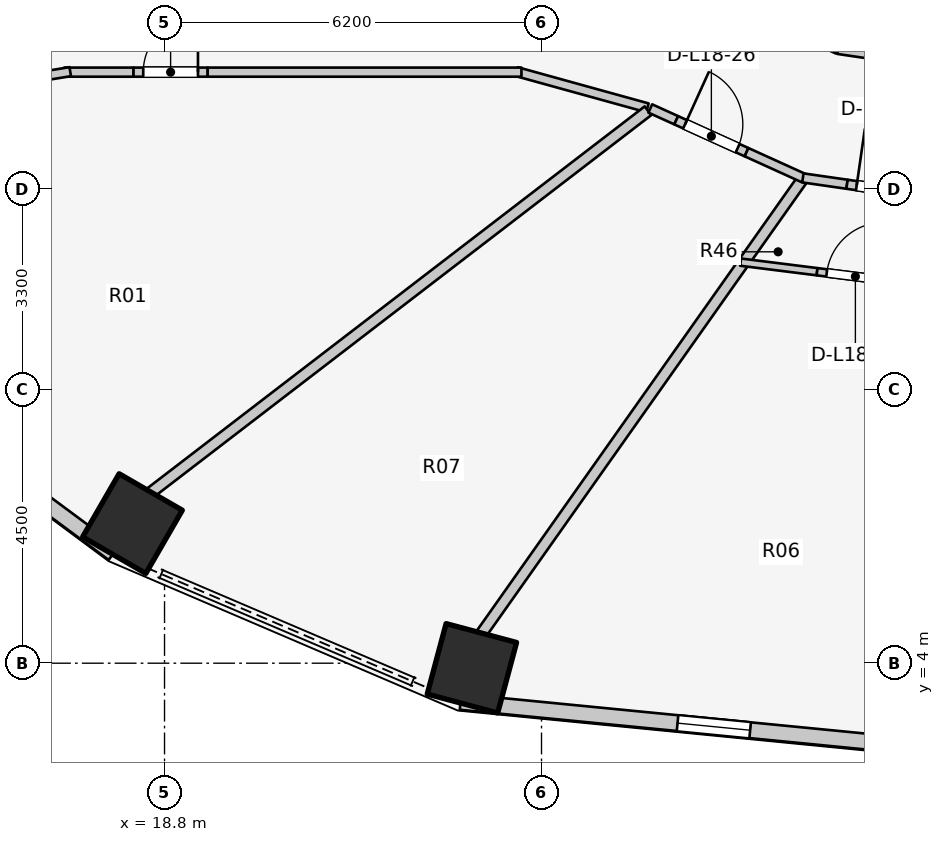
"""IFC4 building model, lengths in metres.
Left out: names, types, materials, properties, quantities, classifications, styles, units other than length and angle.
Written with IfcOpenShell. Run it as: python <this file> out.ifc"""

import sys

from ifc_helpers import new_model, si_unit, direction, frame, frame_2d, origin, origin_2d, place, context, subcontext, project, spatial, rectangle, extrude, element, fill, save


model = new_model("IFC4")
c1 = context("Model", 3, precision=1e-05, world=origin(), true_north=direction((0.0, 1.0)))
c2 = subcontext(c1, "Body", "Model", "MODEL_VIEW")
j1 = project(units=[si_unit("LENGTHUNIT", "METRE"), si_unit("PLANEANGLEUNIT", "RADIAN")], contexts=[c1])
p1 = place(None, origin())
s1 = spatial("IfcSite", under=j1, at=p1, CompositionType="ELEMENT")
p2 = place(p1, origin())
s2 = spatial("IfcBuilding", under=s1, at=p2, CompositionType="ELEMENT")
p3 = place(p2, frame((0.0, 0.0, 61.7)))
s3 = spatial("IfcBuildingStorey", under=s2, at=p3, CompositionType="ELEMENT", Elevation=61.7)
for number, where, z_axis, x_axis in (
    (1, (18.273, 6.296, 0.0), (0.0, 0.0, 1.0), (-0.5, -0.866, 0.0)),
    (2, (23.855, 3.916, 0.0), (0.0, 0.0, 1.0), (-0.259, -0.966, 0.0)),
):
    element("IfcColumn", number, at=place(p3, frame(where, z_axis=z_axis, x_axis=x_axis)), inside=s3, PredefinedType="COLUMN", context=c2, shape_type="SweptSolid", body=[
        extrude(rectangle(XDim=1.2, YDim=1.2, at=origin_2d()), origin(), (0.0, 0.0, 1.0), 3.1),
    ])
p4 = place(p3, frame((13.595, 9.035, 0.0), z_axis=(0.0, 0.0, 1.0), x_axis=(0.803477531792, -0.595335078679, 0.0)))
e3 = element("IfcWall", 3, at=p4, inside=s3, PredefinedType="STANDARD", context=c2, shape_type="SweptSolid", body=[
    extrude(rectangle(XDim=5.43, YDim=0.26, at=frame_2d((2.715, 0.0))), origin(), (0.0, 0.0, 1.0), 1.22),
])
p5 = place(p3, frame((23.668, 3.364, 0.0), z_axis=(0.0, 0.0, 1.0), x_axis=(0.995247718352, -0.097375454379, 0.0)))
e4 = element("IfcWall", 4, at=p5, inside=s3, PredefinedType="STANDARD", context=c2, shape_type="SweptSolid", body=[
    extrude(rectangle(XDim=8.372, YDim=0.26, at=frame_2d((4.186, 0.0))), origin(), (0.0, 0.0, 1.0), 1.22),
])
p6 = place(p5, frame((3.586, 0.0, 0.15)))
e5 = element("IfcOpeningElement", 5, at=p6, cuts=e4, PredefinedType="OPENING", context=c2, shape_type="SweptSolid", body=[
    extrude(rectangle(XDim=1.2, YDim=0.9, at=frame_2d((0.6, 0.45))), frame((0.0, 0.14, 0.0), z_axis=(0.0, -1.0, 0.0), x_axis=(1.0, 0.0, 0.0)), (0.0, 0.0, 1.0), 0.28),
])
p7 = place(p3, frame((27.89, 15.015, 0.0), z_axis=(0.0, 0.0, 1.0), x_axis=(0.906943449489, -0.421252393975, 0.0)))
e6 = element("IfcWall", 6, at=p7, inside=s3, PredefinedType="PARTITIONING", context=c2, shape_type="SweptSolid", body=[
    extrude(rectangle(XDim=2.186, YDim=0.15, at=frame_2d((1.093, 0.0))), origin(), (0.0, 0.0, 1.0), 1.22),
])
p8 = place(p3, frame((29.873, 14.094, 0.0), z_axis=(0.0, 0.0, 1.0), x_axis=(0.989268584896, -0.146108408166, 0.0)))
e7 = element("IfcWall", 7, at=p8, inside=s3, PredefinedType="PARTITIONING", context=c2, shape_type="SweptSolid", body=[
    extrude(rectangle(XDim=2.151, YDim=0.15, at=frame_2d((1.075, 0.0))), origin(), (0.0, 0.0, 1.0), 1.22),
])
p9 = place(p3, frame((26.742, 13.133, 0.0), z_axis=(0.0, 0.0, 1.0), x_axis=(-0.963833843713, 0.266503886865, 0.0)))
e8 = element("IfcWall", 8, at=p9, inside=s3, PredefinedType="PARTITIONING", context=c2, shape_type="SweptSolid", body=[
    extrude(rectangle(XDim=2.232, YDim=0.15, at=frame_2d((1.116, 0.0))), origin(), (0.0, 0.0, 1.0), 1.22),
])
p10 = place(p3, frame((17.15, 13.72, 0.0), z_axis=(0.0, 0.0, 1.0), x_axis=(1.0, 0.0, 0.0)))
e9 = element("IfcWall", 9, at=p10, inside=s3, PredefinedType="PARTITIONING", context=c2, shape_type="SweptSolid", body=[
    extrude(rectangle(XDim=1.14, YDim=0.15, at=frame_2d((0.57, 0.0))), origin(), (0.0, 0.0, 1.0), 2.575),
])
p11 = place(p3, frame((18.29, 13.72, 0.0), z_axis=(0.0, 0.0, 1.0), x_axis=(1.0, 0.0, 0.0)))
e10 = element("IfcWall", 10, at=p11, inside=s3, PredefinedType="PARTITIONING", context=c2, shape_type="SweptSolid", body=[
    extrude(rectangle(XDim=1.22, YDim=0.15, at=frame_2d((0.61, 0.0))), origin(), (0.0, 0.0, 1.0), 2.575),
])
p12 = place(p11, frame((0.16, 0.0, 0.0)))
e11 = element("IfcOpeningElement", 11, at=p12, cuts=e10, PredefinedType="OPENING", context=c2, shape_type="SweptSolid", body=[
    extrude(rectangle(XDim=0.9, YDim=2.1, at=frame_2d((0.45, 1.05))), frame((0.0, 0.085, 0.0), z_axis=(0.0, -1.0, 0.0), x_axis=(1.0, 0.0, 0.0)), (0.0, 0.0, 1.0), 0.17),
])
p13 = place(p3, frame((19.51, 13.72, 0.0), z_axis=(0.0, 0.0, 1.0), x_axis=(1.0, 0.0, 0.0)))
e12 = element("IfcWall", 12, at=p13, inside=s3, PredefinedType="PARTITIONING", context=c2, shape_type="SweptSolid", body=[
    extrude(rectangle(XDim=5.16, YDim=0.15, at=frame_2d((2.58, 0.0))), origin(), (0.0, 0.0, 1.0), 1.22),
])
p14 = place(p3, frame((17.249, 13.728, 0.0), z_axis=(0.0, 0.0, 1.0), x_axis=(-0.98693078372, -0.161144742846, 0.0)))
e13 = element("IfcWall", 13, at=p14, inside=s3, PredefinedType="PARTITIONING", context=c2, shape_type="SweptSolid", body=[
    extrude(rectangle(XDim=7.557, YDim=0.15, at=frame_2d((3.779, 0.0))), origin(), (0.0, 0.0, 1.0), 1.22),
])
p15 = place(p3, frame((26.751, 13.085, 0.0), z_axis=(0.0, 0.0, 1.0), x_axis=(-0.793181014702, -0.608985942298, 0.0)))
e14 = element("IfcWall", 14, at=p15, inside=s3, PredefinedType="PARTITIONING", context=c2, shape_type="SweptSolid", body=[
    extrude(rectangle(XDim=10.324, YDim=0.18, at=frame_2d((5.162, 0.0))), origin(), (0.0, 0.0, 1.0), 1.22),
])
p16 = place(p3, frame((29.274, 11.934, 0.0), z_axis=(0.0, 0.0, 1.0), x_axis=(-0.577036915124, -0.816718065543, 0.0)))
e15 = element("IfcWall", 15, at=p16, inside=s3, PredefinedType="PARTITIONING", context=c2, shape_type="SweptSolid", body=[
    extrude(rectangle(XDim=9.131, YDim=0.18, at=frame_2d((4.565, 0.0))), origin(), (0.0, 0.0, 1.0), 1.22),
])
p17 = place(p3, frame((26.789, 13.123, 0.0), z_axis=(0.0, 0.0, 1.0), x_axis=(0.910580557663, -0.413331644091, 0.0)))
e16 = element("IfcWall", 16, at=p17, inside=s3, PredefinedType="PARTITIONING", context=c2, shape_type="SweptSolid", body=[
    extrude(rectangle(XDim=0.469, YDim=0.15, at=frame_2d((0.234, 0.0))), origin(), (0.0, 0.0, 1.0), 2.575),
])
p18 = place(p3, frame((27.215, 12.929, 0.0), z_axis=(0.0, 0.0, 1.0), x_axis=(0.910491529429, -0.413527719553, 0.0)))
e17 = element("IfcWall", 17, at=p18, inside=s3, PredefinedType="PARTITIONING", context=c2, shape_type="SweptSolid", body=[
    extrude(rectangle(XDim=1.27, YDim=0.15, at=frame_2d((0.635, 0.0))), origin(), (0.0, 0.0, 1.0), 2.16),
])
p19 = place(p18, frame((0.16, 0.0, 0.0)))
e18 = element("IfcOpeningElement", 18, at=p19, cuts=e17, PredefinedType="OPENING", context=c2, shape_type="SweptSolid", body=[
    extrude(rectangle(XDim=0.95, YDim=2.1, at=frame_2d((0.475, 1.05))), frame((0.0, 0.085, 0.0), z_axis=(0.0, -1.0, 0.0), x_axis=(1.0, 0.0, 0.0)), (0.0, 0.0, 1.0), 0.17),
])
p20 = place(p3, frame((28.372, 12.404, 0.0), z_axis=(0.0, 0.0, 1.0), x_axis=(0.910657491524, -0.413162114831, 0.0)))
e19 = element("IfcWall", 19, at=p20, inside=s3, PredefinedType="PARTITIONING", context=c2, shape_type="SweptSolid", body=[
    extrude(rectangle(XDim=1.033, YDim=0.15, at=frame_2d((0.517, 0.0))), origin(), (0.0, 0.0, 1.0), 1.22),
])
p21 = place(p3, frame((28.274, 10.596, 0.0), z_axis=(0.0, 0.0, 1.0), x_axis=(0.992227415201, -0.124437761642, 0.0)))
e20 = element("IfcWall", 20, at=p21, inside=s3, PredefinedType="MOVABLE", context=c2, shape_type="SweptSolid", body=[
    extrude(rectangle(XDim=1.267, YDim=0.12, at=frame_2d((0.634, 0.0))), origin(), (0.0, 0.0, 1.0), 2.575),
])
p22 = place(p3, frame((29.532, 10.438, 0.0), z_axis=(0.0, 0.0, 1.0), x_axis=(0.992257157897, -0.124200372796, 0.0)))
e21 = element("IfcWall", 21, at=p22, inside=s3, PredefinedType="MOVABLE", context=c2, shape_type="SweptSolid", body=[
    extrude(rectangle(XDim=1.27, YDim=0.12, at=frame_2d((0.635, 0.0))), origin(), (0.0, 0.0, 1.0), 2.575),
])
p23 = place(p22, frame((0.16, 0.0, 0.0)))
e22 = element("IfcOpeningElement", 22, at=p23, cuts=e21, PredefinedType="OPENING", context=c2, shape_type="SweptSolid", body=[
    extrude(rectangle(XDim=0.95, YDim=2.1, at=frame_2d((0.475, 1.05))), frame((0.0, 0.07, 0.0), z_axis=(0.0, -1.0, 0.0), x_axis=(1.0, 0.0, 0.0)), (0.0, 0.0, 1.0), 0.14),
])
p24 = place(p3, frame((29.299, 11.981, 0.0), z_axis=(0.0, 0.0, 1.0), x_axis=(0.98974875873, -0.142819447526, 0.0)))
e23 = element("IfcWall", 23, at=p24, inside=s3, PredefinedType="PARTITIONING", context=c2, shape_type="SweptSolid", body=[
    extrude(rectangle(XDim=0.733, YDim=0.15, at=frame_2d((0.367, 0.0))), origin(), (0.0, 0.0, 1.0), 2.575),
])
p25 = place(p3, frame((30.024, 11.876, 0.0), z_axis=(0.0, 0.0, 1.0), x_axis=(0.98974859422, -0.142820587591, 0.0)))
e24 = element("IfcWall", 24, at=p25, inside=s3, PredefinedType="PARTITIONING", context=c2, shape_type="SweptSolid", body=[
    extrude(rectangle(XDim=1.27, YDim=0.15, at=frame_2d((0.635, 0.0))), origin(), (0.0, 0.0, 1.0), 2.575),
])
p26 = place(p25, frame((0.16, 0.0, 0.0)))
e25 = element("IfcOpeningElement", 25, at=p26, cuts=e24, PredefinedType="OPENING", context=c2, shape_type="SweptSolid", body=[
    extrude(rectangle(XDim=0.95, YDim=2.1, at=frame_2d((0.475, 1.05))), frame((0.0, 0.085, 0.0), z_axis=(0.0, -1.0, 0.0), x_axis=(1.0, 0.0, 0.0)), (0.0, 0.0, 1.0), 0.17),
])
p27 = place(p6, origin())
e26 = element("IfcWindow", 26, at=p27, inside=s3, PartitioningType="SINGLE_PANEL", PredefinedType="WINDOW", context=c2, shape_type="SweptSolid", body=[
    extrude(rectangle(XDim=1.2, YDim=0.9, at=frame_2d((0.6, 0.45))), frame((0.0, 0.03, 0.0), z_axis=(0.0, -1.0, 0.0), x_axis=(1.0, 0.0, 0.0)), (0.0, 0.0, 1.0), 0.06),
])
fill(e5, e26)
p28 = place(p12, origin())
e27 = element("IfcDoor", 27, at=p28, inside=s3, OperationType="SINGLE_SWING_RIGHT", PredefinedType="DOOR", context=c2, shape_type="SweptSolid", body=[
    extrude(rectangle(XDim=0.9, YDim=2.1, at=frame_2d((0.45, 1.05))), frame((0.0, 0.025, 0.0), z_axis=(0.0, -1.0, 0.0), x_axis=(1.0, 0.0, 0.0)), (0.0, 0.0, 1.0), 0.05),
])
fill(e11, e27)
p29 = place(p19, origin())
e28 = element("IfcDoor", 28, at=p29, inside=s3, OperationType="SINGLE_SWING_LEFT", PredefinedType="DOOR", context=c2, shape_type="SweptSolid", body=[
    extrude(rectangle(XDim=0.95, YDim=2.1, at=frame_2d((0.475, 1.05))), frame((0.0, 0.025, 0.0), z_axis=(0.0, -1.0, 0.0), x_axis=(1.0, 0.0, 0.0)), (0.0, 0.0, 1.0), 0.05),
])
fill(e18, e28)
p30 = place(p23, origin())
e29 = element("IfcDoor", 29, at=p30, inside=s3, OperationType="SINGLE_SWING_RIGHT", PredefinedType="DOOR", context=c2, shape_type="SweptSolid", body=[
    extrude(rectangle(XDim=0.95, YDim=2.1, at=frame_2d((0.475, 1.05))), frame((0.0, 0.025, 0.0), z_axis=(0.0, -1.0, 0.0), x_axis=(1.0, 0.0, 0.0)), (0.0, 0.0, 1.0), 0.05),
])
fill(e22, e29)
p31 = place(p26, origin())
e30 = element("IfcDoor", 30, at=p31, inside=s3, OperationType="SINGLE_SWING_LEFT", PredefinedType="DOOR", context=c2, shape_type="SweptSolid", body=[
    extrude(rectangle(XDim=0.95, YDim=2.1, at=frame_2d((0.475, 1.05))), frame((0.0, 0.025, 0.0), z_axis=(0.0, -1.0, 0.0), x_axis=(1.0, 0.0, 0.0)), (0.0, 0.0, 1.0), 0.05),
])
fill(e25, e30)
save(model, sys.argv[1])
